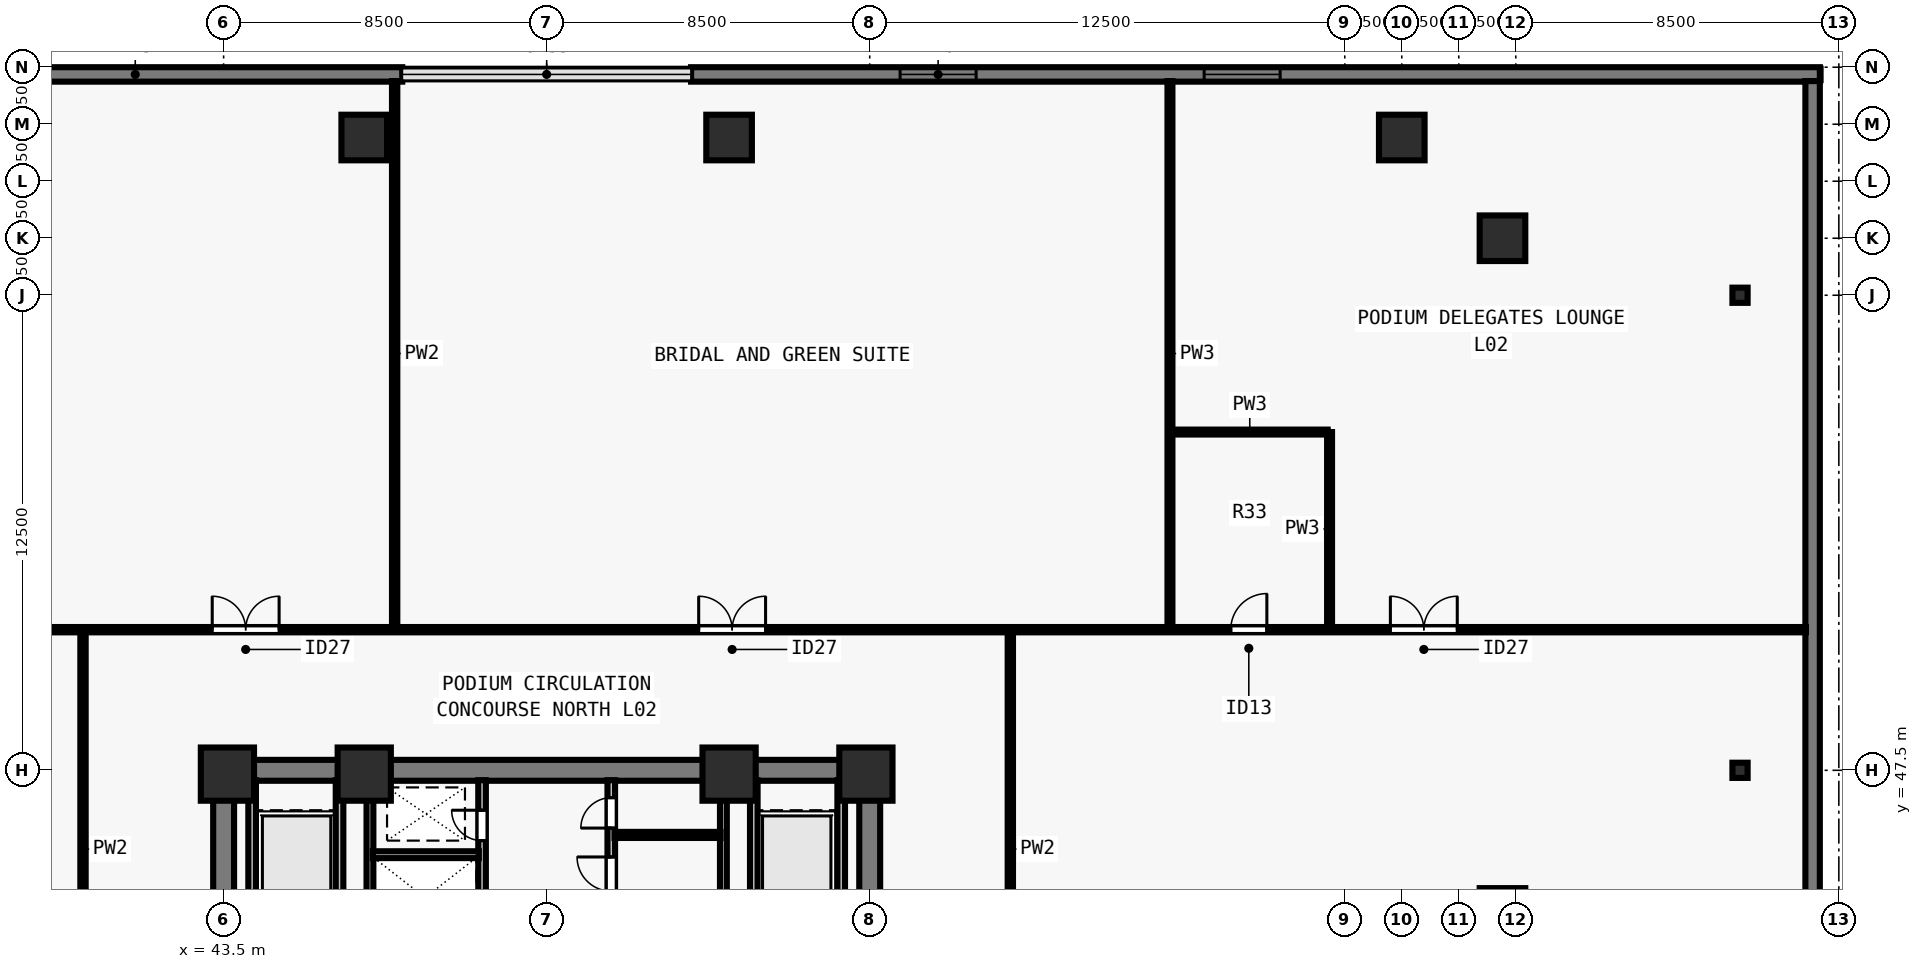
"""IFC4 building model, lengths in metres.
Left out: names, types, materials, properties, quantities, classifications, styles, units other than length and angle.
Written with IfcOpenShell. Run it as: python <this file> out.ifc"""

import sys

from ifc_helpers import new_model, si_unit, direction, frame, frame_2d, origin, origin_2d, place, context, subcontext, project, spatial, rectangle, i_section, extrude, element, fill, save


model = new_model("IFC4")
c1 = context("Model", 3, precision=1e-05, world=origin(), true_north=direction((0.0, 1.0)))
c2 = subcontext(c1, "Body", "Model", "MODEL_VIEW")
j1 = project(units=[si_unit("LENGTHUNIT", "METRE"), si_unit("PLANEANGLEUNIT", "RADIAN")], contexts=[c1])
p1 = place(None, origin())
s1 = spatial("IfcSite", under=j1, at=p1, CompositionType="ELEMENT")
p2 = place(p1, origin())
s2 = spatial("IfcBuilding", under=s1, at=p2, CompositionType="ELEMENT")
p3 = place(p2, frame((0.0, 0.0, 10.0)))
s3 = spatial("IfcBuildingStorey", under=s2, at=p3, CompositionType="ELEMENT", Elevation=10.0)
for number, where, z_axis, x_axis in (
    (1, (43.6, 47.4, 0.0), (0.0, 0.0, 1.0), (1.0, 0.0, 0.0)),
    (2, (47.2, 47.4, 0.0), (0.0, 0.0, 1.0), (1.0, 0.0, 0.0)),
    (3, (56.8, 47.4, 0.0), (0.0, 0.0, 1.0), (1.0, 0.0, 0.0)),
    (4, (60.4, 47.4, 0.0), (0.0, 0.0, 1.0), (1.0, 0.0, 0.0)),
):
    element("IfcColumn", number, at=place(p3, frame(where, z_axis=z_axis, x_axis=x_axis)), inside=s3, PredefinedType="COLUMN", context=c2, shape_type="SweptSolid", body=[
        extrude(rectangle(XDim=1.4, YDim=1.4, at=origin_2d()), origin(), (0.0, 0.0, 1.0), 4.5),
    ])
for number, where, z_axis, x_axis in (
    (5, (77.15, 43.8, 0.0), (0.0, 0.0, 1.0), (1.0, 0.0, 0.0)),
    (6, (77.15, 61.5, 0.0), (0.0, 0.0, 1.0), (1.0, 0.0, 0.0)),
    (7, (74.5, 64.15, 0.0), (0.0, 0.0, 1.0), (1.0, 0.0, 0.0)),
    (8, (56.8, 64.15, 0.0), (0.0, 0.0, 1.0), (1.0, 0.0, 0.0)),
    (9, (47.2, 64.15, 0.0), (0.0, 0.0, 1.0), (1.0, 0.0, 0.0)),
):
    element("IfcColumn", number, at=place(p3, frame(where, z_axis=z_axis, x_axis=x_axis)), inside=s3, PredefinedType="COLUMN", context=c2, shape_type="SweptSolid", body=[
        extrude(rectangle(XDim=1.2, YDim=1.2, at=origin_2d()), origin(), (0.0, 0.0, 1.0), 4.5),
    ])
for number, where, z_axis, x_axis in (
    (10, (83.4, 47.5, 0.0), (0.0, 0.0, 1.0), (1.0, 0.0, 0.0)),
    (11, (83.4, 60.0, 0.0), (0.0, 0.0, 1.0), (1.0, 0.0, 0.0)),
):
    element("IfcColumn", number, at=place(p3, frame(where, z_axis=z_axis, x_axis=x_axis)), inside=s3, PredefinedType="COLUMN", context=c2, shape_type="SweptSolid", body=[
        extrude(i_section(OverallWidth=0.4, OverallDepth=0.4, WebThickness=0.028, FlangeThickness=0.045, at=origin_2d()), origin(), (0.0, 0.0, 1.0), 4.5),
    ])
p4 = place(p3, frame((18.5, 65.81, 0.0), z_axis=(0.0, 0.0, 1.0), x_axis=(1.0, 0.0, 0.0)))
e12 = element("IfcWall", 12, at=p4, inside=s3, PredefinedType="SOLIDWALL", context=c2, shape_type="SweptSolid", body=[
    extrude(rectangle(XDim=29.7, YDim=0.38, at=frame_2d((14.85, 0.0))), origin(), (0.0, 0.0, 1.0), 4.22),
])
p5 = place(p4, frame((5.5, 0.0, 0.8)))
e13 = element("IfcOpeningElement", 13, at=p5, cuts=e12, PredefinedType="OPENING", context=c2, shape_type="SweptSolid", body=[
    extrude(rectangle(XDim=2.0, YDim=2.346, at=frame_2d((1.0, 1.173))), frame((0.0, 0.2, 0.0), z_axis=(0.0, -1.0, 0.0), x_axis=(1.0, 0.0, 0.0)), (0.0, 0.0, 1.0), 0.4),
])
p6 = place(p4, frame((13.5, 0.0, 0.8)))
e14 = element("IfcOpeningElement", 14, at=p6, cuts=e12, PredefinedType="OPENING", context=c2, shape_type="SweptSolid", body=[
    extrude(rectangle(XDim=2.0, YDim=2.346, at=frame_2d((1.0, 1.173))), frame((0.0, 0.2, 0.0), z_axis=(0.0, -1.0, 0.0), x_axis=(1.0, 0.0, 0.0)), (0.0, 0.0, 1.0), 0.4),
])
p7 = place(p3, frame((55.8, 65.81, 0.0), z_axis=(0.0, 0.0, 1.0), x_axis=(1.0, 0.0, 0.0)))
e15 = element("IfcWall", 15, at=p7, inside=s3, PredefinedType="SOLIDWALL", context=c2, shape_type="SweptSolid", body=[
    extrude(rectangle(XDim=29.7, YDim=0.38, at=frame_2d((14.85, 0.0))), origin(), (0.0, 0.0, 1.0), 4.22),
])
p8 = place(p7, frame((5.5, 0.0, 0.8)))
e16 = element("IfcOpeningElement", 16, at=p8, cuts=e15, PredefinedType="OPENING", context=c2, shape_type="SweptSolid", body=[
    extrude(rectangle(XDim=2.0, YDim=2.346, at=frame_2d((1.0, 1.173))), frame((0.0, 0.2, 0.0), z_axis=(0.0, -1.0, 0.0), x_axis=(1.0, 0.0, 0.0)), (0.0, 0.0, 1.0), 0.4),
])
p9 = place(p7, frame((13.5, 0.0, 0.8)))
e17 = element("IfcOpeningElement", 17, at=p9, cuts=e15, PredefinedType="OPENING", context=c2, shape_type="SweptSolid", body=[
    extrude(rectangle(XDim=2.0, YDim=2.346, at=frame_2d((1.0, 1.173))), frame((0.0, 0.2, 0.0), z_axis=(0.0, -1.0, 0.0), x_axis=(1.0, 0.0, 0.0)), (0.0, 0.0, 1.0), 0.4),
])
p10 = place(p3, frame((85.31, 65.635, 0.0), z_axis=(0.0, 0.0, 1.0), x_axis=(0.0, -1.0, 0.0)))
e18 = element("IfcWall", 18, at=p10, inside=s3, PredefinedType="SOLIDWALL", context=c2, shape_type="SweptSolid", body=[
    extrude(rectangle(XDim=53.27, YDim=0.38, at=frame_2d((26.635, 0.0))), origin(), (0.0, 0.0, 1.0), 4.22),
])
p11 = place(p3, frame((43.225, 47.5, 0.0), z_axis=(0.0, 0.0, 1.0), x_axis=(1.0, 0.0, 0.0)))
e19 = element("IfcWall", 19, at=p11, inside=s3, PredefinedType="SHEAR", context=c2, shape_type="SweptSolid", body=[
    extrude(rectangle(XDim=17.55, YDim=0.55, at=frame_2d((8.775, 0.0))), origin(), (0.0, 0.0, 1.0), 4.22),
])
for number, where, z_axis, x_axis in (
    (20, (43.5, 40.8, 0.0), (0.0, 0.0, 1.0), (0.0, 1.0, 0.0)),
    (21, (60.5, 40.8, 0.0), (0.0, 0.0, 1.0), (0.0, 1.0, 0.0)),
):
    element("IfcWall", number, at=place(p3, frame(where, z_axis=z_axis, x_axis=x_axis)), inside=s3, PredefinedType="SHEAR", context=c2, shape_type="SweptSolid", body=[
        extrude(rectangle(XDim=6.435, YDim=0.55, at=frame_2d((3.218, 0.0))), origin(), (0.0, 0.0, 1.0), 4.22),
    ])
p12 = place(p3, frame((50.3, 40.585, 0.0), z_axis=(0.0, 0.0, 1.0), x_axis=(0.0, 1.0, 0.0)))
e22 = element("IfcWall", 22, at=p12, inside=s3, PredefinedType="SOLIDWALL", context=c2, shape_type="SweptSolid", body=[
    extrude(rectangle(XDim=6.655, YDim=0.2, at=frame_2d((3.328, 0.0))), origin(), (0.0, 0.0, 1.0), 4.22),
])
p13 = place(p12, frame((5.065, 0.0, 0.0)))
e23 = element("IfcOpeningElement", 23, at=p13, cuts=e22, PredefinedType="OPENING", context=c2, shape_type="SweptSolid", body=[
    extrude(rectangle(XDim=0.8, YDim=2.08, at=frame_2d((0.4, 1.04))), frame((0.0, 0.11, 0.0), z_axis=(0.0, -1.0, 0.0), x_axis=(1.0, 0.0, 0.0)), (0.0, 0.0, 1.0), 0.22),
])
p14 = place(p3, frame((53.7, 40.585, 0.0), z_axis=(0.0, 0.0, 1.0), x_axis=(0.0, 1.0, 0.0)))
e24 = element("IfcWall", 24, at=p14, inside=s3, PredefinedType="SOLIDWALL", context=c2, shape_type="SweptSolid", body=[
    extrude(rectangle(XDim=6.655, YDim=0.2, at=frame_2d((3.328, 0.0))), origin(), (0.0, 0.0, 1.0), 4.22),
])
p15 = place(p14, frame((0.195, 0.0, 0.0)))
e25 = element("IfcOpeningElement", 25, at=p15, cuts=e24, PredefinedType="OPENING", context=c2, shape_type="SweptSolid", body=[
    extrude(rectangle(XDim=0.8, YDim=2.08, at=frame_2d((0.4, 1.04))), frame((0.0, 0.11, 0.0), z_axis=(0.0, -1.0, 0.0), x_axis=(1.0, 0.0, 0.0)), (0.0, 0.0, 1.0), 0.22),
])
p16 = place(p14, frame((3.735, 0.0, 0.0)))
e26 = element("IfcOpeningElement", 26, at=p16, cuts=e24, PredefinedType="OPENING", context=c2, shape_type="SweptSolid", body=[
    extrude(rectangle(XDim=0.9, YDim=2.12, at=frame_2d((0.45, 1.06))), frame((0.0, 0.11, 0.0), z_axis=(0.0, -1.0, 0.0), x_axis=(1.0, 0.0, 0.0)), (0.0, 0.0, 1.0), 0.22),
])
p17 = place(p14, frame((5.395, 0.0, 0.0)))
e27 = element("IfcOpeningElement", 27, at=p17, cuts=e24, PredefinedType="OPENING", context=c2, shape_type="SweptSolid", body=[
    extrude(rectangle(XDim=0.8, YDim=2.1, at=frame_2d((0.4, 1.05))), frame((0.0, 0.11, 0.0), z_axis=(0.0, -1.0, 0.0), x_axis=(1.0, 0.0, 0.0)), (0.0, 0.0, 1.0), 0.22),
])
for number, where, z_axis, x_axis in (
    (28, (46.55, 43.735, 0.0), (0.0, 0.0, 1.0), (0.0, 1.0, 0.0)),
    (29, (44.25, 43.735, 0.0), (0.0, 0.0, 1.0), (0.0, 1.0, 0.0)),
    (30, (57.45, 43.735, 0.0), (0.0, 0.0, 1.0), (0.0, 1.0, 0.0)),
    (31, (59.75, 43.735, 0.0), (0.0, 0.0, 1.0), (0.0, 1.0, 0.0)),
):
    element("IfcWall", number, at=place(p3, frame(where, z_axis=z_axis, x_axis=x_axis)), inside=s3, PredefinedType="SOLIDWALL", context=c2, shape_type="SweptSolid", body=[
        extrude(rectangle(XDim=3.505, YDim=0.2, at=frame_2d((1.752, 0.0))), origin(), (0.0, 0.0, 1.0), 4.22),
    ])
p18 = place(p3, frame((47.35, 43.735, 0.0), z_axis=(0.0, 0.0, 1.0), x_axis=(0.0, 1.0, 0.0)))
e32 = element("IfcWall", 32, at=p18, inside=s3, PredefinedType="SOLIDWALL", context=c2, shape_type="SweptSolid", body=[
    extrude(rectangle(XDim=3.505, YDim=0.18, at=frame_2d((1.752, 0.0))), origin(), (0.0, 0.0, 1.0), 4.22),
])
p19 = place(p3, frame((47.425, 45.28, 0.0), z_axis=(0.0, 0.0, 1.0), x_axis=(1.0, 0.0, 0.0)))
e33 = element("IfcWall", 33, at=p19, inside=s3, PredefinedType="SOLIDWALL", context=c2, shape_type="SweptSolid", body=[
    extrude(rectangle(XDim=2.79, YDim=0.18, at=frame_2d((1.395, 0.0))), origin(), (0.0, 0.0, 1.0), 4.22),
])
p20 = place(p3, frame((56.65, 43.735, 0.0), z_axis=(0.0, 0.0, 1.0), x_axis=(0.0, 1.0, 0.0)))
e34 = element("IfcWall", 34, at=p20, inside=s3, PredefinedType="SOLIDWALL", context=c2, shape_type="SweptSolid", body=[
    extrude(rectangle(XDim=3.505, YDim=0.18, at=frame_2d((1.752, 0.0))), origin(), (0.0, 0.0, 1.0), 4.22),
])
p21 = place(p3, frame((53.785, 45.8, 0.0), z_axis=(0.0, 0.0, 1.0), x_axis=(1.0, 0.0, 0.0)))
e35 = element("IfcWall", 35, at=p21, inside=s3, PredefinedType="PARTITIONING", context=c2, shape_type="SweptSolid", body=[
    extrude(rectangle(XDim=2.79, YDim=0.16, at=frame_2d((1.395, 0.0))), origin(), (0.0, 0.0, 1.0), 4.22),
])
p22 = place(p3, frame((18.865, 51.2, 0.0), z_axis=(0.0, 0.0, 1.0), x_axis=(1.0, 0.0, 0.0)))
e36 = element("IfcWall", 36, at=p22, inside=s3, PredefinedType="PARTITIONING", context=c2, shape_type="SweptSolid", body=[
    extrude(rectangle(XDim=66.27, YDim=0.14, at=frame_2d((33.135, 0.0))), origin(), (0.0, 0.0, 1.0), 3.738),
])
p23 = place(p22, frame((24.335, 0.0, 0.0)))
e37 = element("IfcOpeningElement", 37, at=p23, cuts=e36, PredefinedType="OPENING", context=c2, shape_type="SweptSolid", body=[
    extrude(rectangle(XDim=1.76, YDim=2.2, at=frame_2d((0.88, 1.1))), frame((0.0, 0.08, 0.0), z_axis=(0.0, -1.0, 0.0), x_axis=(1.0, 0.0, 0.0)), (0.0, 0.0, 1.0), 0.16),
])
p24 = place(p22, frame((37.135, 0.0, 0.0)))
e38 = element("IfcOpeningElement", 38, at=p24, cuts=e36, PredefinedType="OPENING", context=c2, shape_type="SweptSolid", body=[
    extrude(rectangle(XDim=1.76, YDim=2.2, at=frame_2d((0.88, 1.1))), frame((0.0, 0.08, 0.0), z_axis=(0.0, -1.0, 0.0), x_axis=(1.0, 0.0, 0.0)), (0.0, 0.0, 1.0), 0.16),
])
p25 = place(p22, frame((51.135, 0.0, 0.0)))
e39 = element("IfcOpeningElement", 39, at=p25, cuts=e36, PredefinedType="OPENING", context=c2, shape_type="SweptSolid", body=[
    extrude(rectangle(XDim=0.95, YDim=2.1, at=frame_2d((0.475, 1.05))), frame((0.0, 0.08, 0.0), z_axis=(0.0, -1.0, 0.0), x_axis=(1.0, 0.0, 0.0)), (0.0, 0.0, 1.0), 0.16),
])
p26 = place(p22, frame((55.335, 0.0, 0.0)))
e40 = element("IfcOpeningElement", 40, at=p26, cuts=e36, PredefinedType="OPENING", context=c2, shape_type="SweptSolid", body=[
    extrude(rectangle(XDim=1.76, YDim=2.2, at=frame_2d((0.88, 1.1))), frame((0.0, 0.08, 0.0), z_axis=(0.0, -1.0, 0.0), x_axis=(1.0, 0.0, 0.0)), (0.0, 0.0, 1.0), 0.16),
])
p27 = place(p3, frame((39.8, 26.855, 0.0), z_axis=(0.0, 0.0, 1.0), x_axis=(0.0, 1.0, 0.0)))
e41 = element("IfcWall", 41, at=p27, inside=s3, PredefinedType="PARTITIONING", context=c2, shape_type="SweptSolid", body=[
    extrude(rectangle(XDim=24.29, YDim=0.14, at=frame_2d((12.145, 0.0))), origin(), (0.0, 0.0, 1.0), 4.22),
])
p28 = place(p27, frame((10.945, 0.0, 0.0)))
e42 = element("IfcOpeningElement", 42, at=p28, cuts=e41, PredefinedType="OPENING", context=c2, shape_type="SweptSolid", body=[
    extrude(rectangle(XDim=1.76, YDim=2.2, at=frame_2d((0.88, 1.1))), frame((0.0, 0.08, 0.0), z_axis=(0.0, -1.0, 0.0), x_axis=(1.0, 0.0, 0.0)), (0.0, 0.0, 1.0), 0.16),
])
p29 = place(p3, frame((64.2, 26.855, 0.0), z_axis=(0.0, 0.0, 1.0), x_axis=(0.0, 1.0, 0.0)))
e43 = element("IfcWall", 43, at=p29, inside=s3, PredefinedType="PARTITIONING", context=c2, shape_type="SweptSolid", body=[
    extrude(rectangle(XDim=24.29, YDim=0.14, at=frame_2d((12.145, 0.0))), origin(), (0.0, 0.0, 1.0), 4.22),
])
p30 = place(p29, frame((10.945, 0.0, 0.0)))
e44 = element("IfcOpeningElement", 44, at=p30, cuts=e43, PredefinedType="OPENING", context=c2, shape_type="SweptSolid", body=[
    extrude(rectangle(XDim=1.76, YDim=2.2, at=frame_2d((0.88, 1.1))), frame((0.0, 0.08, 0.0), z_axis=(0.0, -1.0, 0.0), x_axis=(1.0, 0.0, 0.0)), (0.0, 0.0, 1.0), 0.16),
])
p31 = place(p3, frame((48.0, 51.3, 0.0), z_axis=(0.0, 0.0, 1.0), x_axis=(0.0, 1.0, 0.0)))
e45 = element("IfcWall", 45, at=p31, inside=s3, PredefinedType="PARTITIONING", context=c2, shape_type="SweptSolid", body=[
    extrude(rectangle(XDim=14.335, YDim=0.14, at=frame_2d((7.167, 0.0))), origin(), (0.0, 0.0, 1.0), 4.22),
])
p32 = place(p3, frame((68.4, 51.3, 0.0), z_axis=(0.0, 0.0, 1.0), x_axis=(0.0, 1.0, 0.0)))
e46 = element("IfcWall", 46, at=p32, inside=s3, PredefinedType="PLUMBINGWALL", context=c2, shape_type="SweptSolid", body=[
    extrude(rectangle(XDim=14.335, YDim=0.13, at=frame_2d((7.167, 0.0))), origin(), (0.0, 0.0, 1.0), 3.271),
])
p33 = place(p3, frame((72.6, 51.3, 0.0), z_axis=(0.0, 0.0, 1.0), x_axis=(0.0, 1.0, 0.0)))
e47 = element("IfcWall", 47, at=p33, inside=s3, PredefinedType="PLUMBINGWALL", context=c2, shape_type="SweptSolid", body=[
    extrude(rectangle(XDim=5.1, YDim=0.13, at=frame_2d((2.55, 0.0))), origin(), (0.0, 0.0, 1.0), 4.22),
])
p34 = place(p3, frame((68.45, 56.4, 0.0), z_axis=(0.0, 0.0, 1.0), x_axis=(1.0, 0.0, 0.0)))
e48 = element("IfcWall", 48, at=p34, inside=s3, PredefinedType="PLUMBINGWALL", context=c2, shape_type="SweptSolid", body=[
    extrude(rectangle(XDim=4.1, YDim=0.13, at=frame_2d((2.05, 0.0))), origin(), (0.0, 0.0, 1.0), 3.738),
])
p35 = place(p8, origin())
e49 = element("IfcWindow", 49, at=p35, inside=s3, PartitioningType="SINGLE_PANEL", PredefinedType="WINDOW", context=c2, shape_type="SweptSolid", body=[
    extrude(rectangle(XDim=2.0, YDim=2.346, at=frame_2d((1.0, 1.173))), frame((0.0, -0.05, 0.0), z_axis=(0.0, -1.0, 0.0), x_axis=(1.0, 0.0, 0.0)), (0.0, 0.0, 1.0), 0.06),
])
fill(e16, e49)
p36 = place(p9, origin())
e50 = element("IfcWindow", 50, at=p36, inside=s3, PartitioningType="SINGLE_PANEL", PredefinedType="WINDOW", context=c2, shape_type="SweptSolid", body=[
    extrude(rectangle(XDim=2.0, YDim=2.346, at=frame_2d((1.0, 1.173))), frame((0.0, -0.05, 0.0), z_axis=(0.0, -1.0, 0.0), x_axis=(1.0, 0.0, 0.0)), (0.0, 0.0, 1.0), 0.06),
])
fill(e17, e50)
p37 = place(p13, origin())
e51 = element("IfcDoor", 51, at=p37, inside=s3, OperationType="SINGLE_SWING_RIGHT", PredefinedType="DOOR", context=c2, shape_type="SweptSolid", body=[
    extrude(rectangle(XDim=0.8, YDim=2.08, at=frame_2d((0.4, 1.04))), frame((0.0, 0.025, 0.0), z_axis=(0.0, -1.0, 0.0), x_axis=(1.0, 0.0, 0.0)), (0.0, 0.0, 1.0), 0.05),
])
fill(e23, e51)
p38 = place(p16, origin())
e52 = element("IfcDoor", 52, at=p38, inside=s3, OperationType="SINGLE_SWING_RIGHT", PredefinedType="DOOR", context=c2, shape_type="SweptSolid", body=[
    extrude(rectangle(XDim=0.9, YDim=2.12, at=frame_2d((0.45, 1.06))), frame((0.0, 0.025, 0.0), z_axis=(0.0, -1.0, 0.0), x_axis=(1.0, 0.0, 0.0)), (0.0, 0.0, 1.0), 0.05),
])
fill(e26, e52)
p39 = place(p17, origin())
e53 = element("IfcDoor", 53, at=p39, inside=s3, OperationType="SINGLE_SWING_LEFT", PredefinedType="DOOR", context=c2, shape_type="SweptSolid", body=[
    extrude(rectangle(XDim=0.8, YDim=2.1, at=frame_2d((0.4, 1.05))), frame((0.0, 0.025, 0.0), z_axis=(0.0, -1.0, 0.0), x_axis=(1.0, 0.0, 0.0)), (0.0, 0.0, 1.0), 0.05),
])
fill(e27, e53)
p40 = place(p23, origin())
e54 = element("IfcDoor", 54, at=p40, inside=s3, OperationType="DOUBLE_DOOR_SINGLE_SWING", PredefinedType="DOOR", context=c2, shape_type="SweptSolid", body=[
    extrude(rectangle(XDim=1.76, YDim=2.2, at=frame_2d((0.88, 1.1))), frame((0.0, 0.025, 0.0), z_axis=(0.0, -1.0, 0.0), x_axis=(1.0, 0.0, 0.0)), (0.0, 0.0, 1.0), 0.05),
])
fill(e37, e54)
p41 = place(p24, origin())
e55 = element("IfcDoor", 55, at=p41, inside=s3, OperationType="DOUBLE_DOOR_SINGLE_SWING", PredefinedType="DOOR", context=c2, shape_type="SweptSolid", body=[
    extrude(rectangle(XDim=1.76, YDim=2.2, at=frame_2d((0.88, 1.1))), frame((0.0, 0.025, 0.0), z_axis=(0.0, -1.0, 0.0), x_axis=(1.0, 0.0, 0.0)), (0.0, 0.0, 1.0), 0.05),
])
fill(e38, e55)
p42 = place(p25, origin())
e56 = element("IfcDoor", 56, at=p42, inside=s3, OperationType="SINGLE_SWING_RIGHT", PredefinedType="DOOR", context=c2, shape_type="SweptSolid", body=[
    extrude(rectangle(XDim=0.95, YDim=2.1, at=frame_2d((0.475, 1.05))), frame((0.0, 0.025, 0.0), z_axis=(0.0, -1.0, 0.0), x_axis=(1.0, 0.0, 0.0)), (0.0, 0.0, 1.0), 0.05),
])
fill(e39, e56)
p43 = place(p26, origin())
e57 = element("IfcDoor", 57, at=p43, inside=s3, OperationType="DOUBLE_DOOR_SINGLE_SWING", PredefinedType="DOOR", context=c2, shape_type="SweptSolid", body=[
    extrude(rectangle(XDim=1.76, YDim=2.2, at=frame_2d((0.88, 1.1))), frame((0.0, 0.025, 0.0), z_axis=(0.0, -1.0, 0.0), x_axis=(1.0, 0.0, 0.0)), (0.0, 0.0, 1.0), 0.05),
])
fill(e40, e57)
save(model, sys.argv[1])
